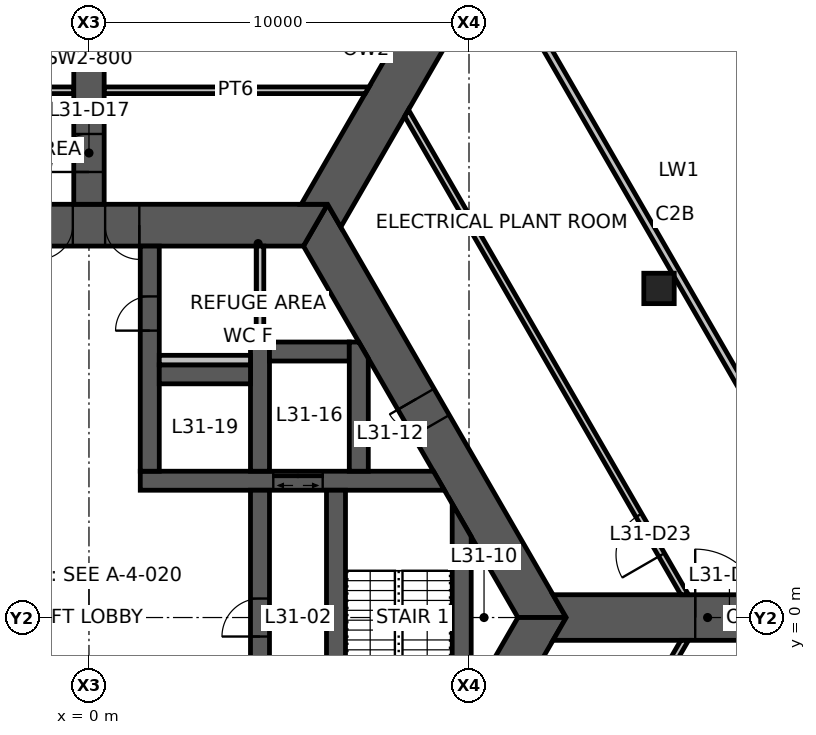
"""IFC4 building model, lengths in metres.
Left out: names, types, materials, properties, quantities, classifications, styles, units other than length and angle.
Written with IfcOpenShell. Run it as: python <this file> out.ifc"""

import sys

from ifc_helpers import new_model, si_unit, direction, frame, frame_2d, origin, origin_2d, place, context, subcontext, project, spatial, polyline, rectangle, hollow_rectangle, outline, extrude, element, fill, save


model = new_model("IFC4")
c1 = context("Model", 3, precision=1e-05, world=origin(), true_north=direction((0.0, 1.0)))
c2 = subcontext(c1, "Body", "Model", "MODEL_VIEW")
j1 = project(units=[si_unit("LENGTHUNIT", "METRE"), si_unit("PLANEANGLEUNIT", "RADIAN")], contexts=[c1])
p1 = place(None, origin())
s1 = spatial("IfcSite", under=j1, at=p1, CompositionType="ELEMENT")
p2 = place(p1, origin())
s2 = spatial("IfcBuilding", under=s1, at=p2, CompositionType="ELEMENT")
p3 = place(p2, frame((0.0, 0.0, 123.6)))
s3 = spatial("IfcBuildingStorey", under=s2, at=p3, CompositionType="ELEMENT", Elevation=123.6)
p4 = place(p3, frame((15.0, 8.66, 0.0), z_axis=(0.0, 0.0, 1.0), x_axis=(1.0, 0.0, 0.0)))
e1 = element("IfcColumn", 1, at=p4, inside=s3, PredefinedType="COLUMN", context=c2, shape_type="SweptSolid", body=[
    extrude(hollow_rectangle(XDim=0.8, YDim=0.8, WallThickness=0.045, at=origin_2d()), origin(), (0.0, 0.0, 1.0), 5.0),
])
p5 = place(p3, frame((11.922, 0.0, 0.0), z_axis=(0.0, 0.0, 1.0), x_axis=(-0.500004296715, 0.866022923061, 0.0)))
e2 = element("IfcWall", 2, at=p5, inside=s3, PredefinedType="SHEAR", context=c2, shape_type="SweptSolid", body=[
    extrude(outline(polyline([(-0.318, -0.55), (5.835, -0.55), (6.635, -0.55), (12.24, -0.55), (11.605, 0.55), (6.635, 0.55), (5.835, 0.55), (0.318, 0.55), (-0.318, -0.55)])), origin(), (0.0, 0.0, 1.0), 5.0),
])
p6 = place(p5, frame((5.835, 0.0, 0.0)))
e3 = element("IfcOpeningElement", 3, at=p6, cuts=e2, PredefinedType="OPENING", context=c2, shape_type="SweptSolid", body=[
    extrude(rectangle(XDim=0.8, YDim=2.1, at=frame_2d((0.4, 1.05))), frame((0.0, 0.56, 0.0), z_axis=(0.0, -1.0, 0.0), x_axis=(1.0, 0.0, 0.0)), (0.0, 0.0, 1.0), 1.12),
])
p7 = place(p3, frame((5.961, 10.325, 0.0), z_axis=(0.0, 0.0, 1.0), x_axis=(-1.0, 0.0, 0.0)))
e4 = element("IfcWall", 4, at=p7, inside=s3, PredefinedType="SHEAR", context=c2, shape_type="SweptSolid", body=[
    extrude(outline(polyline([(-0.318, -0.55), (4.636, -0.55), (5.536, -0.55), (6.386, -0.55), (7.286, -0.55), (12.24, -0.55), (11.605, 0.55), (7.286, 0.55), (6.386, 0.55), (5.536, 0.55), (4.636, 0.55), (0.318, 0.55), (-0.318, -0.55)])), origin(), (0.0, 0.0, 1.0), 5.0),
])
p8 = place(p7, frame((6.386, 0.0, 0.0)))
e5 = element("IfcOpeningElement", 5, at=p8, cuts=e4, PredefinedType="OPENING", context=c2, shape_type="SweptSolid", body=[
    extrude(rectangle(XDim=0.9, YDim=2.1, at=frame_2d((0.45, 1.05))), frame((0.0, 0.56, 0.0), z_axis=(0.0, -1.0, 0.0), x_axis=(1.0, 0.0, 0.0)), (0.0, 0.0, 1.0), 1.12),
])
p9 = place(p7, frame((4.636, 0.0, 0.0)))
e6 = element("IfcOpeningElement", 6, at=p9, cuts=e4, PredefinedType="OPENING", context=c2, shape_type="SweptSolid", body=[
    extrude(rectangle(XDim=0.9, YDim=2.1, at=frame_2d((0.45, 1.05))), frame((0.0, 0.56, 0.0), z_axis=(0.0, -1.0, 0.0), x_axis=(1.0, 0.0, 0.0)), (0.0, 0.0, 1.0), 1.12),
])
p10 = place(p3, frame((5.961, -10.325, 0.0), z_axis=(0.0, 0.0, 1.0), x_axis=(0.500004296715, 0.866022923061, 0.0)))
e7 = element("IfcWall", 7, at=p10, inside=s3, PredefinedType="SHEAR", context=c2, shape_type="SweptSolid", body=[
    extrude(outline(polyline([(-0.318, -0.55), (4.594, -0.55), (5.394, -0.55), (12.24, -0.55), (11.605, 0.55), (5.394, 0.55), (4.594, 0.55), (0.318, 0.55), (-0.318, -0.55)])), origin(), (0.0, 0.0, 1.0), 5.0),
])
p11 = place(p10, frame((4.594, 0.0, 0.0)))
e8 = element("IfcOpeningElement", 8, at=p11, cuts=e7, PredefinedType="OPENING", context=c2, shape_type="SweptSolid", body=[
    extrude(rectangle(XDim=0.8, YDim=2.1, at=frame_2d((0.4, 1.05))), frame((0.0, 0.56, 0.0), z_axis=(0.0, -1.0, 0.0), x_axis=(1.0, 0.0, 0.0)), (0.0, 0.0, 1.0), 1.12),
])
p12 = place(p3, frame((0.0, 10.875, 0.0), z_axis=(0.0, 0.0, 1.0), x_axis=(0.0, 1.0, 0.0)))
e9 = element("IfcWall", 9, at=p12, inside=s3, PredefinedType="SHEAR", context=c2, shape_type="SweptSolid", body=[
    extrude(rectangle(XDim=7.646, YDim=0.8, at=frame_2d((3.823, 0.0))), origin(), (0.0, 0.0, 1.0), 5.0),
])
p13 = place(p12, frame((0.85, 0.0, 0.0)))
e10 = element("IfcOpeningElement", 10, at=p13, cuts=e9, PredefinedType="OPENING", context=c2, shape_type="SweptSolid", body=[
    extrude(rectangle(XDim=1.0, YDim=2.1, at=frame_2d((0.5, 1.05))), frame((0.0, 0.41, 0.0), z_axis=(0.0, -1.0, 0.0), x_axis=(1.0, 0.0, 0.0)), (0.0, 0.0, 1.0), 0.82),
])
p14 = place(p3, frame((12.557, 0.0, -1.15), z_axis=(0.0, 0.0, 1.0), x_axis=(1.0, 0.0, 0.0)))
e11 = element("IfcWall", 11, at=p14, inside=s3, PredefinedType="SHEAR", context=c2, shape_type="SweptSolid", body=[
    extrude(outline(polyline([(-0.346, -0.6), (3.395, -0.6), (5.195, -0.6), (7.443, -0.6), (7.443, 0.6), (5.195, 0.6), (3.395, 0.6), (-0.346, 0.6), (0.0, 0.0), (-0.346, -0.6)])), origin(), (0.0, 0.0, 1.0), 6.15),
])
p15 = place(p14, frame((3.395, 0.0, 1.15)))
e12 = element("IfcOpeningElement", 12, at=p15, cuts=e11, PredefinedType="OPENING", context=c2, shape_type="SweptSolid", body=[
    extrude(rectangle(XDim=1.8, YDim=2.4, at=frame_2d((0.9, 1.2))), frame((0.0, 0.61, 0.0), z_axis=(0.0, -1.0, 0.0), x_axis=(1.0, 0.0, 0.0)), (0.0, 0.0, 1.0), 1.22),
])
p16 = place(p3, frame((6.279, 10.875, -1.15), z_axis=(0.0, 0.0, 1.0), x_axis=(0.50000923905, 0.866020069551, 0.0)))
e13 = element("IfcWall", 13, at=p16, inside=s3, PredefinedType="SHEAR", context=c2, shape_type="SweptSolid", body=[
    extrude(outline(polyline([(-0.346, -0.6), (7.443, -0.6), (7.443, 0.6), (-0.346, 0.6), (0.0, 0.0), (-0.346, -0.6)])), origin(), (0.0, 0.0, 1.0), 6.15),
])
p17 = place(p3, frame((20.389, 0.526, 0.0), z_axis=(0.0, 0.0, 1.0), x_axis=(-0.499999841607, 0.866025495233, 0.0)))
e14 = element("IfcWall", 14, at=p17, inside=s3, PredefinedType="ELEMENTEDWALL", context=c2, shape_type="SweptSolid", body=[
    extrude(rectangle(XDim=19.479, YDim=0.2, at=frame_2d((9.739, 0.0))), origin(), (0.0, 0.0, 1.0), 5.0),
])
p18 = place(p3, frame((1.35, 3.6, 0.0), z_axis=(0.0, 0.0, 1.0), x_axis=(1.0, 0.0, 0.0)))
e15 = element("IfcWall", 15, at=p18, inside=s3, PredefinedType="SHEAR", context=c2, shape_type="SweptSolid", body=[
    extrude(outline(polyline([(0.0, -0.25), (3.5, -0.25), (4.8, -0.25), (8.003, -0.25), (7.714, 0.25), (4.8, 0.25), (3.5, 0.25), (0.0, 0.25), (0.0, -0.25)])), origin(), (0.0, 0.0, 1.0), 5.0),
])
p19 = place(p18, frame((3.5, 0.0, 0.0)))
e16 = element("IfcOpeningElement", 16, at=p19, cuts=e15, PredefinedType="OPENING", context=c2, shape_type="SweptSolid", body=[
    extrude(rectangle(XDim=1.3, YDim=2.1, at=frame_2d((0.65, 1.05))), frame((0.0, 0.26, 0.0), z_axis=(0.0, -1.0, 0.0), x_axis=(1.0, 0.0, 0.0)), (0.0, 0.0, 1.0), 0.52),
])
p20 = place(p3, frame((1.6, 3.85, 0.0), z_axis=(0.0, 0.0, 1.0), x_axis=(0.0, 1.0, 0.0)))
e17 = element("IfcWall", 17, at=p20, inside=s3, PredefinedType="SHEAR", context=c2, shape_type="SweptSolid", body=[
    extrude(rectangle(XDim=5.925, YDim=0.5, at=frame_2d((2.962, 0.0))), origin(), (0.0, 0.0, 1.0), 5.0),
])
p21 = place(p20, frame((3.7, 0.0, 0.0)))
e18 = element("IfcOpeningElement", 18, at=p21, cuts=e17, PredefinedType="OPENING", context=c2, shape_type="SweptSolid", body=[
    extrude(rectangle(XDim=0.9, YDim=2.1, at=frame_2d((0.45, 1.05))), frame((0.0, 0.26, 0.0), z_axis=(0.0, -1.0, 0.0), x_axis=(1.0, 0.0, 0.0)), (0.0, 0.0, 1.0), 0.52),
])
p22 = place(p3, frame((4.5, -3.35, 0.0), z_axis=(0.0, 0.0, 1.0), x_axis=(0.0, 1.0, 0.0)))
e19 = element("IfcWall", 19, at=p22, inside=s3, PredefinedType="SHEAR", context=c2, shape_type="SweptSolid", body=[
    extrude(rectangle(XDim=6.7, YDim=0.5, at=frame_2d((3.35, 0.0))), origin(), (0.0, 0.0, 1.0), 5.0),
])
p23 = place(p22, frame((2.85, 0.0, 0.0)))
e20 = element("IfcOpeningElement", 20, at=p23, cuts=e19, PredefinedType="OPENING", context=c2, shape_type="SweptSolid", body=[
    extrude(rectangle(XDim=1.0, YDim=2.1, at=frame_2d((0.5, 1.05))), frame((0.0, 0.26, 0.0), z_axis=(0.0, -1.0, 0.0), x_axis=(1.0, 0.0, 0.0)), (0.0, 0.0, 1.0), 0.52),
])
p24 = place(p3, frame((6.5, -3.35, 0.0), z_axis=(0.0, 0.0, 1.0), x_axis=(0.0, 1.0, 0.0)))
e21 = element("IfcWall", 21, at=p24, inside=s3, PredefinedType="SHEAR", context=c2, shape_type="SweptSolid", body=[
    extrude(rectangle(XDim=6.7, YDim=0.5, at=frame_2d((3.35, 0.0))), origin(), (0.0, 0.0, 1.0), 5.0),
])
p25 = place(p24, frame((0.1, 0.0, 0.0)))
e22 = element("IfcOpeningElement", 22, at=p25, cuts=e21, PredefinedType="OPENING", context=c2, shape_type="SweptSolid", body=[
    extrude(rectangle(XDim=1.0, YDim=2.1, at=frame_2d((0.5, 1.05))), frame((0.0, 0.26, 0.0), z_axis=(0.0, -1.0, 0.0), x_axis=(1.0, 0.0, 0.0)), (0.0, 0.0, 1.0), 0.52),
])
p26 = place(p3, frame((4.5, 3.85, 0.0), z_axis=(0.0, 0.0, 1.0), x_axis=(0.0, 1.0, 0.0)))
e23 = element("IfcWall", 23, at=p26, inside=s3, PredefinedType="SHEAR", context=c2, shape_type="SweptSolid", body=[
    extrude(rectangle(XDim=3.4, YDim=0.5, at=frame_2d((1.7, 0.0))), origin(), (0.0, 0.0, 1.0), 5.0),
])
p27 = place(p3, frame((1.85, 6.4, 0.0), z_axis=(0.0, 0.0, 1.0), x_axis=(1.0, 0.0, 0.0)))
e24 = element("IfcWall", 24, at=p27, inside=s3, PredefinedType="SHEAR", context=c2, shape_type="SweptSolid", body=[
    extrude(rectangle(XDim=2.4, YDim=0.5, at=frame_2d((1.2, 0.0))), origin(), (0.0, 0.0, 1.0), 5.0),
])
p28 = place(p3, frame((4.75, 7.0, 0.0), z_axis=(0.0, 0.0, 1.0), x_axis=(1.0, 0.0, 0.0)))
e25 = element("IfcWall", 25, at=p28, inside=s3, PredefinedType="SHEAR", context=c2, shape_type="SweptSolid", body=[
    extrude(rectangle(XDim=2.1, YDim=0.5, at=frame_2d((1.05, 0.0))), origin(), (0.0, 0.0, 1.0), 5.0),
])
p29 = place(p3, frame((7.1, 3.85, 0.0), z_axis=(0.0, 0.0, 1.0), x_axis=(0.0, 1.0, 0.0)))
e26 = element("IfcWall", 26, at=p29, inside=s3, PredefinedType="SHEAR", context=c2, shape_type="SweptSolid", body=[
    extrude(outline(polyline([(0.0, -0.25), (2.969, -0.25), (3.4, 0.0), (3.4, 0.25), (0.0, 0.25), (0.0, -0.25)])), origin(), (0.0, 0.0, 1.0), 5.0),
])
p30 = place(p3, frame((9.808, -2.562, 0.0), z_axis=(0.0, 0.0, 1.0), x_axis=(0.0, 1.0, 0.0)))
e27 = element("IfcWall", 27, at=p30, inside=s3, PredefinedType="SHEAR", context=c2, shape_type="SweptSolid", body=[
    extrude(outline(polyline([(0.433, -0.25), (4.691, -0.25), (5.558, 0.25), (-0.433, 0.25), (0.433, -0.25)])), origin(), (0.0, 0.0, 1.0), 5.0),
])
p31 = place(p3, frame((4.5, 7.25, 0.0), z_axis=(0.0, 0.0, 1.0), x_axis=(0.0, 1.0, 0.0)))
e28 = element("IfcWall", 28, at=p31, inside=s3, PredefinedType="STANDARD", context=c2, shape_type="SweptSolid", body=[
    extrude(rectangle(XDim=2.525, YDim=0.2, at=frame_2d((1.262, 0.0))), origin(), (0.0, 0.0, 1.0), 5.0),
])
p32 = place(p3, frame((1.85, 6.775, 0.0), z_axis=(0.0, 0.0, 1.0), x_axis=(1.0, 0.0, 0.0)))
e29 = element("IfcWall", 29, at=p32, inside=s3, PredefinedType="PLUMBINGWALL", context=c2, shape_type="SweptSolid", body=[
    extrude(rectangle(XDim=2.4, YDim=0.25, at=frame_2d((1.2, 0.0))), origin(), (0.0, 0.0, 1.0), 5.0),
])
p33 = place(p3, frame((15.675, 0.6, 0.0), z_axis=(0.0, 0.0, 1.0), x_axis=(-0.500003545903, 0.866023356546, 0.0)))
e30 = element("IfcWall", 30, at=p33, inside=s3, PredefinedType="PARTITIONING", context=c2, shape_type="SweptSolid", body=[
    extrude(outline(polyline([(-0.051, -0.087), (1.213, -0.087), (2.413, -0.087), (14.686, -0.087), (14.585, 0.087), (2.413, 0.087), (1.213, 0.087), (0.051, 0.087), (-0.051, -0.087)])), origin(), (0.0, 0.0, 1.0), 4.8),
])
p34 = place(p33, frame((1.213, 0.0, 0.0)))
e31 = element("IfcOpeningElement", 31, at=p34, cuts=e30, PredefinedType="OPENING", context=c2, shape_type="SweptSolid", body=[
    extrude(rectangle(XDim=1.2, YDim=2.1, at=frame_2d((0.6, 1.05))), frame((0.0, 0.098, 0.0), z_axis=(0.0, -1.0, 0.0), x_axis=(1.0, 0.0, 0.0)), (0.0, 0.0, 1.0), 0.195),
])
p35 = place(p3, frame((7.318, 13.875, 0.0), z_axis=(0.0, 0.0, 1.0), x_axis=(-1.0, 0.0, 0.0)))
e32 = element("IfcWall", 32, at=p35, inside=s3, PredefinedType="PARTITIONING", context=c2, shape_type="SweptSolid", body=[
    extrude(outline(polyline([(-0.051, -0.087), (6.913, -0.087), (6.913, 0.087), (0.051, 0.087), (-0.051, -0.087)])), origin(), (0.0, 0.0, 1.0), 4.8),
])
p36 = place(p3, frame((-0.405, 13.875, 0.0), z_axis=(0.0, 0.0, 1.0), x_axis=(-1.0, 0.0, 0.0)))
e33 = element("IfcWall", 33, at=p36, inside=s3, PredefinedType="PARTITIONING", context=c2, shape_type="SweptSolid", body=[
    extrude(outline(polyline([(0.0, -0.087), (1.9, -0.087), (3.1, -0.087), (6.963, -0.087), (6.862, 0.087), (3.1, 0.087), (1.9, 0.087), (0.0, 0.087), (0.0, -0.087)])), origin(), (0.0, 0.0, 1.0), 4.8),
])
p37 = place(p36, frame((1.9, 0.0, 0.0)))
e34 = element("IfcOpeningElement", 34, at=p37, cuts=e33, PredefinedType="OPENING", context=c2, shape_type="SweptSolid", body=[
    extrude(rectangle(XDim=1.2, YDim=2.1, at=frame_2d((0.6, 1.05))), frame((0.0, 0.098, 0.0), z_axis=(0.0, -1.0, 0.0), x_axis=(1.0, 0.0, 0.0)), (0.0, 0.0, 1.0), 0.195),
])
p38 = place(p3, frame((12.219, -6.587, 0.0), z_axis=(0.0, 0.0, 1.0), x_axis=(0.500005739714, 0.866022089933, 0.0)))
e35 = element("IfcWall", 35, at=p38, inside=s3, PredefinedType="PARTITIONING", context=c2, shape_type="SweptSolid", body=[
    extrude(outline(polyline([(0.0, -0.087), (1.9, -0.087), (3.1, -0.087), (6.964, -0.087), (6.863, 0.087), (3.1, 0.087), (1.9, 0.087), (0.0, 0.087), (0.0, -0.087)])), origin(), (0.0, 0.0, 1.0), 4.8),
])
p39 = place(p38, frame((1.9, 0.0, 0.0)))
e36 = element("IfcOpeningElement", 36, at=p39, cuts=e35, PredefinedType="OPENING", context=c2, shape_type="SweptSolid", body=[
    extrude(rectangle(XDim=1.2, YDim=2.1, at=frame_2d((0.6, 1.05))), frame((0.0, 0.098, 0.0), z_axis=(0.0, -1.0, 0.0), x_axis=(1.0, 0.0, 0.0)), (0.0, 0.0, 1.0), 0.195),
])
p40 = place(p8, origin())
e37 = element("IfcDoor", 37, at=p40, inside=s3, OperationType="SINGLE_SWING_RIGHT", PredefinedType="DOOR", context=c2, shape_type="SweptSolid", body=[
    extrude(rectangle(XDim=0.9, YDim=2.1, at=frame_2d((0.45, 1.05))), frame((0.0, 0.025, 0.0), z_axis=(0.0, -1.0, 0.0), x_axis=(1.0, 0.0, 0.0)), (0.0, 0.0, 1.0), 0.05),
])
fill(e5, e37)
p41 = place(p9, origin())
e38 = element("IfcDoor", 38, at=p41, inside=s3, OperationType="SINGLE_SWING_LEFT", PredefinedType="DOOR", context=c2, shape_type="SweptSolid", body=[
    extrude(rectangle(XDim=0.9, YDim=2.1, at=frame_2d((0.45, 1.05))), frame((0.0, 0.025, 0.0), z_axis=(0.0, -1.0, 0.0), x_axis=(1.0, 0.0, 0.0)), (0.0, 0.0, 1.0), 0.05),
])
fill(e6, e38)
p42 = place(p6, origin())
e39 = element("IfcDoor", 39, at=p42, inside=s3, OperationType="SINGLE_SWING_RIGHT", PredefinedType="DOOR", context=c2, shape_type="SweptSolid", body=[
    extrude(rectangle(XDim=0.8, YDim=2.1, at=frame_2d((0.4, 1.05))), frame((0.0, 0.025, 0.0), z_axis=(0.0, -1.0, 0.0), x_axis=(1.0, 0.0, 0.0)), (0.0, 0.0, 1.0), 0.05),
])
fill(e3, e39)
p43 = place(p23, origin())
e40 = element("IfcDoor", 40, at=p43, inside=s3, OperationType="SINGLE_SWING_LEFT", PredefinedType="DOOR", context=c2, shape_type="SweptSolid", body=[
    extrude(rectangle(XDim=1.0, YDim=2.1, at=frame_2d((0.5, 1.05))), frame((0.0, 0.025, 0.0), z_axis=(0.0, -1.0, 0.0), x_axis=(1.0, 0.0, 0.0)), (0.0, 0.0, 1.0), 0.05),
])
fill(e20, e40)
p44 = place(p21, origin())
e41 = element("IfcDoor", 41, at=p44, inside=s3, OperationType="SINGLE_SWING_LEFT", PredefinedType="DOOR", context=c2, shape_type="SweptSolid", body=[
    extrude(rectangle(XDim=0.9, YDim=2.1, at=frame_2d((0.45, 1.05))), frame((0.0, 0.025, 0.0), z_axis=(0.0, -1.0, 0.0), x_axis=(1.0, 0.0, 0.0)), (0.0, 0.0, 1.0), 0.05),
])
fill(e18, e41)
p45 = place(p13, origin())
e42 = element("IfcDoor", 42, at=p45, inside=s3, OperationType="SINGLE_SWING_LEFT", PredefinedType="DOOR", context=c2, shape_type="SweptSolid", body=[
    extrude(rectangle(XDim=1.0, YDim=2.1, at=frame_2d((0.5, 1.05))), frame((0.0, 0.025, 0.0), z_axis=(0.0, -1.0, 0.0), x_axis=(1.0, 0.0, 0.0)), (0.0, 0.0, 1.0), 0.05),
])
fill(e10, e42)
p46 = place(p15, origin())
e43 = element("IfcDoor", 43, at=p46, inside=s3, OperationType="DOUBLE_DOOR_SINGLE_SWING", PredefinedType="DOOR", context=c2, shape_type="SweptSolid", body=[
    extrude(rectangle(XDim=1.8, YDim=2.4, at=frame_2d((0.9, 1.2))), frame((0.0, 0.025, 0.0), z_axis=(0.0, -1.0, 0.0), x_axis=(1.0, 0.0, 0.0)), (0.0, 0.0, 1.0), 0.05),
])
fill(e12, e43)
p47 = place(p34, origin())
e44 = element("IfcDoor", 44, at=p47, inside=s3, OperationType="DOUBLE_DOOR_SINGLE_SWING", PredefinedType="DOOR", context=c2, shape_type="SweptSolid", body=[
    extrude(rectangle(XDim=1.2, YDim=2.1, at=frame_2d((0.6, 1.05))), frame((0.0, 0.025, 0.0), z_axis=(0.0, -1.0, 0.0), x_axis=(1.0, 0.0, 0.0)), (0.0, 0.0, 1.0), 0.05),
])
fill(e31, e44)
p48 = place(p19, origin())
e45 = element("IfcDoor", 45, at=p48, inside=s3, OperationType="DOUBLE_DOOR_SLIDING", PredefinedType="DOOR", context=c2, shape_type="SweptSolid", body=[
    extrude(rectangle(XDim=1.3, YDim=2.1, at=frame_2d((0.65, 1.05))), frame((0.0, 0.025, 0.0), z_axis=(0.0, -1.0, 0.0), x_axis=(1.0, 0.0, 0.0)), (0.0, 0.0, 1.0), 0.05),
])
fill(e16, e45)
save(model, sys.argv[1])
